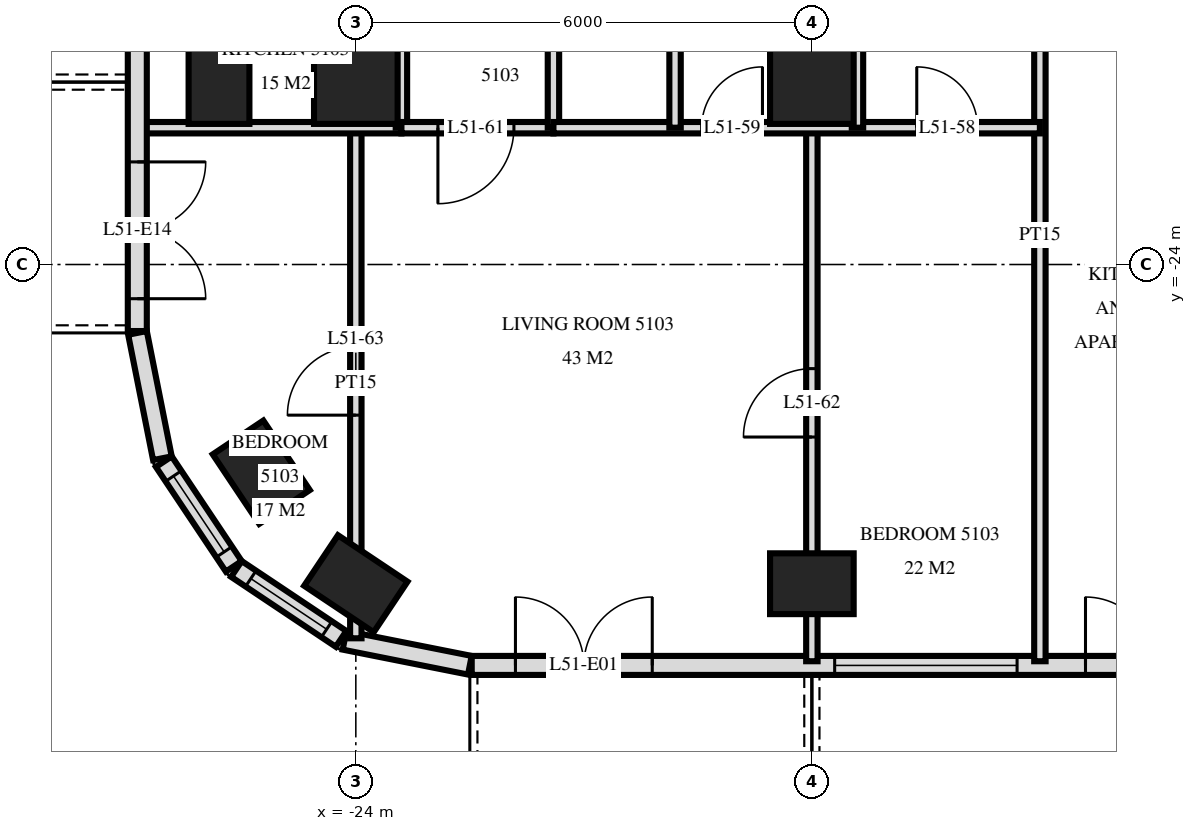
"""IFC4 building model, lengths in metres.
Left out: names, types, materials, properties, quantities, classifications, styles, units other than length and angle.
Written with IfcOpenShell. Run it as: python <this file> out.ifc"""

import sys

from ifc_helpers import new_model, si_unit, direction, frame, frame_2d, origin, origin_2d, place, context, subcontext, project, spatial, rectangle, extrude, element, fill, save


model = new_model("IFC4")
c1 = context("Model", 3, precision=1e-05, world=origin(), true_north=direction((0.0, 1.0)))
c2 = subcontext(c1, "Body", "Model", "MODEL_VIEW")
j1 = project(units=[si_unit("LENGTHUNIT", "METRE"), si_unit("PLANEANGLEUNIT", "RADIAN")], contexts=[c1])
p1 = place(None, origin())
s1 = spatial("IfcSite", under=j1, at=p1, CompositionType="ELEMENT")
p2 = place(p1, origin())
s2 = spatial("IfcBuilding", under=s1, at=p2, CompositionType="ELEMENT")
p3 = place(p2, frame((0.0, 0.0, 197.6)))
s3 = spatial("IfcBuildingStorey", under=s2, at=p3, CompositionType="ELEMENT", Elevation=197.6)
for number, where, z_axis, x_axis in (
    (1, (-25.8, -21.6, 0.0), (0.0, 0.0, 1.0), (0.0, 1.0, 0.0)),
    (2, (-25.244, -26.733, 0.0), (0.0, 0.0, 1.0), (-0.556, 0.831, 0.0)),
    (3, (-24.0, -28.2, 0.0), (0.0, 0.0, 1.0), (-0.831, 0.556, 0.0)),
):
    element("IfcColumn", number, at=place(p3, frame(where, z_axis=z_axis, x_axis=x_axis)), inside=s3, PredefinedType="COLUMN", context=c2, shape_type="SweptSolid", body=[
        extrude(rectangle(XDim=1.1, YDim=0.8, at=origin_2d()), origin(), (0.0, 0.0, 1.0), 3.5),
    ])
p4 = place(p3, frame((-24.0, -21.6, 0.0), z_axis=(0.0, 0.0, 1.0), x_axis=(1.0, 0.0, 0.0)))
e4 = element("IfcColumn", 4, at=p4, inside=s3, PredefinedType="COLUMN", context=c2, shape_type="SweptSolid", body=[
    extrude(rectangle(XDim=1.1, YDim=1.1, at=origin_2d()), origin(), (0.0, 0.0, 1.0), 3.5),
])
p5 = place(p3, frame((-18.0, -28.2, 0.0), z_axis=(0.0, 0.0, 1.0), x_axis=(1.0, 0.0, 0.0)))
e5 = element("IfcColumn", 5, at=p5, inside=s3, PredefinedType="COLUMN", context=c2, shape_type="SweptSolid", body=[
    extrude(rectangle(XDim=1.1, YDim=0.8, at=origin_2d()), origin(), (0.0, 0.0, 1.0), 3.5),
])
p6 = place(p3, frame((-18.0, -21.6, 0.0), z_axis=(0.0, 0.0, 1.0), x_axis=(1.0, 0.0, 0.0)))
e6 = element("IfcColumn", 6, at=p6, inside=s3, PredefinedType="COLUMN", context=c2, shape_type="SweptSolid", body=[
    extrude(rectangle(XDim=1.1, YDim=1.1, at=origin_2d()), origin(), (0.0, 0.0, 1.0), 3.5),
])
p7 = place(p3, frame((-26.875, -3.325, 0.0), z_axis=(0.0, 0.0, 1.0), x_axis=(0.0, -1.0, 0.0)))
e7 = element("IfcWall", 7, at=p7, inside=s3, PredefinedType="SOLIDWALL", context=c2, shape_type="SweptSolid", body=[
    extrude(rectangle(XDim=21.551, YDim=0.25, at=frame_2d((10.775, 0.0))), origin(), (0.0, 0.0, 1.0), 3.22),
])
p8 = place(p7, frame((7.775, 0.0, 0.0)))
e8 = element("IfcOpeningElement", 8, at=p8, cuts=e7, PredefinedType="OPENING", context=c2, shape_type="SweptSolid", body=[
    extrude(rectangle(XDim=1.8, YDim=2.4, at=frame_2d((0.9, 1.2))), frame((0.0, 0.135, 0.0), z_axis=(0.0, -1.0, 0.0), x_axis=(1.0, 0.0, 0.0)), (0.0, 0.0, 1.0), 0.27),
])
p9 = place(p7, frame((12.575, 0.0, 0.9)))
e9 = element("IfcOpeningElement", 9, at=p9, cuts=e7, PredefinedType="OPENING", context=c2, shape_type="SweptSolid", body=[
    extrude(rectangle(XDim=1.2, YDim=1.5, at=frame_2d((0.6, 0.75))), frame((0.0, 0.135, 0.0), z_axis=(0.0, -1.0, 0.0), x_axis=(1.0, 0.0, 0.0)), (0.0, 0.0, 1.0), 0.27),
])
p10 = place(p7, frame((15.275, 0.0, 0.0)))
e10 = element("IfcOpeningElement", 10, at=p10, cuts=e7, PredefinedType="OPENING", context=c2, shape_type="SweptSolid", body=[
    extrude(rectangle(XDim=1.8, YDim=2.4, at=frame_2d((0.9, 1.2))), frame((0.0, 0.135, 0.0), z_axis=(0.0, -1.0, 0.0), x_axis=(1.0, 0.0, 0.0)), (0.0, 0.0, 1.0), 0.27),
])
p11 = place(p7, frame((19.325, 0.0, 0.0)))
e11 = element("IfcOpeningElement", 11, at=p11, cuts=e7, PredefinedType="OPENING", context=c2, shape_type="SweptSolid", body=[
    extrude(rectangle(XDim=1.8, YDim=2.4, at=frame_2d((0.9, 1.2))), frame((0.0, 0.135, 0.0), z_axis=(0.0, -1.0, 0.0), x_axis=(1.0, 0.0, 0.0)), (0.0, 0.0, 1.0), 0.27),
])
p12 = place(p3, frame((-26.873, -24.9, 0.0), z_axis=(0.0, 0.0, 1.0), x_axis=(0.195026884138, -0.980797896849, 0.0)))
e12 = element("IfcWall", 12, at=p12, inside=s3, PredefinedType="SOLIDWALL", context=c2, shape_type="SweptSolid", body=[
    extrude(rectangle(XDim=1.681, YDim=0.25, at=frame_2d((0.841, 0.0))), origin(), (0.0, 0.0, 1.0), 3.22),
])
p13 = place(p3, frame((-26.526, -26.594, 0.0), z_axis=(0.0, 0.0, 1.0), x_axis=(0.55555029066, -0.831482937015, 0.0)))
e13 = element("IfcWall", 13, at=p13, inside=s3, PredefinedType="SOLIDWALL", context=c2, shape_type="SweptSolid", body=[
    extrude(rectangle(XDim=1.656, YDim=0.25, at=frame_2d((0.828, 0.0))), origin(), (0.0, 0.0, 1.0), 3.22),
])
p14 = place(p13, frame((0.228, 0.0, 0.9)))
e14 = element("IfcOpeningElement", 14, at=p14, cuts=e13, PredefinedType="OPENING", context=c2, shape_type="SweptSolid", body=[
    extrude(rectangle(XDim=1.2, YDim=1.5, at=frame_2d((0.6, 0.75))), frame((0.0, 0.135, 0.0), z_axis=(0.0, -1.0, 0.0), x_axis=(1.0, 0.0, 0.0)), (0.0, 0.0, 1.0), 0.27),
])
p15 = place(p3, frame((-25.571, -28.006, 0.0), z_axis=(0.0, 0.0, 1.0), x_axis=(0.831482937015, -0.55555029066, 0.0)))
e15 = element("IfcWall", 15, at=p15, inside=s3, PredefinedType="SOLIDWALL", context=c2, shape_type="SweptSolid", body=[
    extrude(rectangle(XDim=1.656, YDim=0.25, at=frame_2d((0.828, 0.0))), origin(), (0.0, 0.0, 1.0), 3.22),
])
p16 = place(p15, frame((0.228, 0.0, 0.9)))
e16 = element("IfcOpeningElement", 16, at=p16, cuts=e15, PredefinedType="OPENING", context=c2, shape_type="SweptSolid", body=[
    extrude(rectangle(XDim=1.2, YDim=1.5, at=frame_2d((0.6, 0.75))), frame((0.0, 0.135, 0.0), z_axis=(0.0, -1.0, 0.0), x_axis=(1.0, 0.0, 0.0)), (0.0, 0.0, 1.0), 0.27),
])
p17 = place(p3, frame((-24.149, -28.945, 0.0), z_axis=(0.0, 0.0, 1.0), x_axis=(0.980775640221, -0.19513878023, 0.0)))
e17 = element("IfcWall", 17, at=p17, inside=s3, PredefinedType="SOLIDWALL", context=c2, shape_type="SweptSolid", body=[
    extrude(rectangle(XDim=1.681, YDim=0.25, at=frame_2d((0.841, 0.0))), origin(), (0.0, 0.0, 1.0), 3.22),
])
p18 = place(p3, frame((-22.475, -29.275, 0.0), z_axis=(0.0, 0.0, 1.0), x_axis=(1.0, 0.0, 0.0)))
e18 = element("IfcWall", 18, at=p18, inside=s3, PredefinedType="SOLIDWALL", context=c2, shape_type="SweptSolid", body=[
    extrude(rectangle(XDim=44.951, YDim=0.25, at=frame_2d((22.475, 0.0))), origin(), (0.0, 0.0, 1.0), 3.22),
])
p19 = place(p18, frame((0.575, 0.0, 0.0)))
e19 = element("IfcOpeningElement", 19, at=p19, cuts=e18, PredefinedType="OPENING", context=c2, shape_type="SweptSolid", body=[
    extrude(rectangle(XDim=1.8, YDim=2.4, at=frame_2d((0.9, 1.2))), frame((0.0, 0.135, 0.0), z_axis=(0.0, -1.0, 0.0), x_axis=(1.0, 0.0, 0.0)), (0.0, 0.0, 1.0), 0.27),
])
p20 = place(p18, frame((4.775, 0.0, 0.9)))
e20 = element("IfcOpeningElement", 20, at=p20, cuts=e18, PredefinedType="OPENING", context=c2, shape_type="SweptSolid", body=[
    extrude(rectangle(XDim=2.4, YDim=1.5, at=frame_2d((1.2, 0.75))), frame((0.0, 0.135, 0.0), z_axis=(0.0, -1.0, 0.0), x_axis=(1.0, 0.0, 0.0)), (0.0, 0.0, 1.0), 0.27),
])
p21 = place(p18, frame((8.075, 0.0, 0.0)))
e21 = element("IfcOpeningElement", 21, at=p21, cuts=e18, PredefinedType="OPENING", context=c2, shape_type="SweptSolid", body=[
    extrude(rectangle(XDim=1.8, YDim=2.4, at=frame_2d((0.9, 1.2))), frame((0.0, 0.135, 0.0), z_axis=(0.0, -1.0, 0.0), x_axis=(1.0, 0.0, 0.0)), (0.0, 0.0, 1.0), 0.27),
])
p22 = place(p18, frame((11.075, 0.0, 0.0)))
e22 = element("IfcOpeningElement", 22, at=p22, cuts=e18, PredefinedType="OPENING", context=c2, shape_type="SweptSolid", body=[
    extrude(rectangle(XDim=1.8, YDim=2.4, at=frame_2d((0.9, 1.2))), frame((0.0, 0.135, 0.0), z_axis=(0.0, -1.0, 0.0), x_axis=(1.0, 0.0, 0.0)), (0.0, 0.0, 1.0), 0.27),
])
p23 = place(p18, frame((13.775, 0.0, 0.9)))
e23 = element("IfcOpeningElement", 23, at=p23, cuts=e18, PredefinedType="OPENING", context=c2, shape_type="SweptSolid", body=[
    extrude(rectangle(XDim=2.4, YDim=1.5, at=frame_2d((1.2, 0.75))), frame((0.0, 0.135, 0.0), z_axis=(0.0, -1.0, 0.0), x_axis=(1.0, 0.0, 0.0)), (0.0, 0.0, 1.0), 0.27),
])
p24 = place(p18, frame((16.775, 0.0, 0.9)))
e24 = element("IfcOpeningElement", 24, at=p24, cuts=e18, PredefinedType="OPENING", context=c2, shape_type="SweptSolid", body=[
    extrude(rectangle(XDim=2.4, YDim=1.5, at=frame_2d((1.2, 0.75))), frame((0.0, 0.135, 0.0), z_axis=(0.0, -1.0, 0.0), x_axis=(1.0, 0.0, 0.0)), (0.0, 0.0, 1.0), 0.27),
])
p25 = place(p18, frame((20.075, 0.0, 0.0)))
e25 = element("IfcOpeningElement", 25, at=p25, cuts=e18, PredefinedType="OPENING", context=c2, shape_type="SweptSolid", body=[
    extrude(rectangle(XDim=1.8, YDim=2.4, at=frame_2d((0.9, 1.2))), frame((0.0, 0.135, 0.0), z_axis=(0.0, -1.0, 0.0), x_axis=(1.0, 0.0, 0.0)), (0.0, 0.0, 1.0), 0.27),
])
p26 = place(p18, frame((23.075, 0.0, 0.0)))
e26 = element("IfcOpeningElement", 26, at=p26, cuts=e18, PredefinedType="OPENING", context=c2, shape_type="SweptSolid", body=[
    extrude(rectangle(XDim=1.8, YDim=2.4, at=frame_2d((0.9, 1.2))), frame((0.0, 0.135, 0.0), z_axis=(0.0, -1.0, 0.0), x_axis=(1.0, 0.0, 0.0)), (0.0, 0.0, 1.0), 0.27),
])
p27 = place(p18, frame((25.775, 0.0, 0.9)))
e27 = element("IfcOpeningElement", 27, at=p27, cuts=e18, PredefinedType="OPENING", context=c2, shape_type="SweptSolid", body=[
    extrude(rectangle(XDim=2.4, YDim=1.5, at=frame_2d((1.2, 0.75))), frame((0.0, 0.135, 0.0), z_axis=(0.0, -1.0, 0.0), x_axis=(1.0, 0.0, 0.0)), (0.0, 0.0, 1.0), 0.27),
])
p28 = place(p18, frame((29.075, 0.0, 0.0)))
e28 = element("IfcOpeningElement", 28, at=p28, cuts=e18, PredefinedType="OPENING", context=c2, shape_type="SweptSolid", body=[
    extrude(rectangle(XDim=1.8, YDim=2.4, at=frame_2d((0.9, 1.2))), frame((0.0, 0.135, 0.0), z_axis=(0.0, -1.0, 0.0), x_axis=(1.0, 0.0, 0.0)), (0.0, 0.0, 1.0), 0.27),
])
p29 = place(p18, frame((31.775, 0.0, 0.9)))
e29 = element("IfcOpeningElement", 29, at=p29, cuts=e18, PredefinedType="OPENING", context=c2, shape_type="SweptSolid", body=[
    extrude(rectangle(XDim=2.4, YDim=1.5, at=frame_2d((1.2, 0.75))), frame((0.0, 0.135, 0.0), z_axis=(0.0, -1.0, 0.0), x_axis=(1.0, 0.0, 0.0)), (0.0, 0.0, 1.0), 0.27),
])
p30 = place(p18, frame((35.075, 0.0, 0.0)))
e30 = element("IfcOpeningElement", 30, at=p30, cuts=e18, PredefinedType="OPENING", context=c2, shape_type="SweptSolid", body=[
    extrude(rectangle(XDim=1.8, YDim=2.4, at=frame_2d((0.9, 1.2))), frame((0.0, 0.135, 0.0), z_axis=(0.0, -1.0, 0.0), x_axis=(1.0, 0.0, 0.0)), (0.0, 0.0, 1.0), 0.27),
])
p31 = place(p18, frame((37.775, 0.0, 0.9)))
e31 = element("IfcOpeningElement", 31, at=p31, cuts=e18, PredefinedType="OPENING", context=c2, shape_type="SweptSolid", body=[
    extrude(rectangle(XDim=2.4, YDim=1.5, at=frame_2d((1.2, 0.75))), frame((0.0, 0.135, 0.0), z_axis=(0.0, -1.0, 0.0), x_axis=(1.0, 0.0, 0.0)), (0.0, 0.0, 1.0), 0.27),
])
p32 = place(p18, frame((41.075, 0.0, 0.0)))
e32 = element("IfcOpeningElement", 32, at=p32, cuts=e18, PredefinedType="OPENING", context=c2, shape_type="SweptSolid", body=[
    extrude(rectangle(XDim=1.8, YDim=2.4, at=frame_2d((0.9, 1.2))), frame((0.0, 0.135, 0.0), z_axis=(0.0, -1.0, 0.0), x_axis=(1.0, 0.0, 0.0)), (0.0, 0.0, 1.0), 0.27),
])
p33 = place(p3, frame((-15.0, -29.22, 0.0), z_axis=(0.0, 0.0, 1.0), x_axis=(0.0, 1.0, 0.0)))
e33 = element("IfcWall", 33, at=p33, inside=s3, PredefinedType="PARTITIONING", context=c2, shape_type="SweptSolid", body=[
    extrude(rectangle(XDim=11.22, YDim=0.15, at=frame_2d((5.61, 0.0))), origin(), (0.0, 0.0, 1.0), 3.22),
])
p34 = place(p3, frame((-17.4, -22.2, 0.0), z_axis=(0.0, 0.0, 1.0), x_axis=(0.0, 1.0, 0.0)))
e34 = element("IfcWall", 34, at=p34, inside=s3, PredefinedType="PARTITIONING", context=c2, shape_type="SweptSolid", body=[
    extrude(rectangle(XDim=4.2, YDim=0.15, at=frame_2d((2.1, 0.0))), origin(), (0.0, 0.0, 1.0), 3.22),
])
p35 = place(p3, frame((-18.0, -29.22, 0.0), z_axis=(0.0, 0.0, 1.0), x_axis=(0.0, 1.0, 0.0)))
e35 = element("IfcWall", 35, at=p35, inside=s3, PredefinedType="PARTITIONING", context=c2, shape_type="SweptSolid", body=[
    extrude(rectangle(XDim=7.02, YDim=0.15, at=frame_2d((3.51, 0.0))), origin(), (0.0, 0.0, 1.0), 3.22),
])
p36 = place(p35, frame((2.95, 0.0, 0.0)))
e36 = element("IfcOpeningElement", 36, at=p36, cuts=e35, PredefinedType="OPENING", context=c2, shape_type="SweptSolid", body=[
    extrude(rectangle(XDim=0.9, YDim=2.1, at=frame_2d((0.45, 1.05))), frame((0.0, 0.085, 0.0), z_axis=(0.0, -1.0, 0.0), x_axis=(1.0, 0.0, 0.0)), (0.0, 0.0, 1.0), 0.17),
])
for number, where, z_axis, x_axis in (
    (37, (-19.8, -22.2, 0.0), (0.0, 0.0, 1.0), (0.0, 1.0, 0.0)),
    (38, (-21.4, -22.2, 0.0), (0.0, 0.0, 1.0), (0.0, 1.0, 0.0)),
):
    element("IfcWall", number, at=place(p3, frame(where, z_axis=z_axis, x_axis=x_axis)), inside=s3, PredefinedType="PARTITIONING", context=c2, shape_type="SweptSolid", body=[
        extrude(rectangle(XDim=4.2, YDim=0.15, at=frame_2d((2.1, 0.0))), origin(), (0.0, 0.0, 1.0), 3.22),
    ])
p37 = place(p3, frame((-23.4, -22.2, 0.0), z_axis=(0.0, 0.0, 1.0), x_axis=(0.0, 1.0, 0.0)))
e39 = element("IfcWall", 39, at=p37, inside=s3, PredefinedType="PARTITIONING", context=c2, shape_type="SweptSolid", body=[
    extrude(rectangle(XDim=4.2, YDim=0.15, at=frame_2d((2.1, 0.0))), origin(), (0.0, 0.0, 1.0), 3.22),
])
p38 = place(p37, frame((1.58, 0.0, 0.0)))
e40 = element("IfcOpeningElement", 40, at=p38, cuts=e39, PredefinedType="OPENING", context=c2, shape_type="SweptSolid", body=[
    extrude(rectangle(XDim=1.0, YDim=2.1, at=frame_2d((0.5, 1.05))), frame((0.0, 0.085, 0.0), z_axis=(0.0, -1.0, 0.0), x_axis=(1.0, 0.0, 0.0)), (0.0, 0.0, 1.0), 0.17),
])
p39 = place(p3, frame((-24.0, -28.918, 0.0), z_axis=(0.0, 0.0, 1.0), x_axis=(0.0, 1.0, 0.0)))
e41 = element("IfcWall", 41, at=p39, inside=s3, PredefinedType="PARTITIONING", context=c2, shape_type="SweptSolid", body=[
    extrude(rectangle(XDim=6.718, YDim=0.15, at=frame_2d((3.359, 0.0))), origin(), (0.0, 0.0, 1.0), 3.22),
])
p40 = place(p39, frame((2.936, 0.0, 0.0)))
e42 = element("IfcOpeningElement", 42, at=p40, cuts=e41, PredefinedType="OPENING", context=c2, shape_type="SweptSolid", body=[
    extrude(rectangle(XDim=0.9, YDim=2.1, at=frame_2d((0.45, 1.05))), frame((0.0, 0.085, 0.0), z_axis=(0.0, -1.0, 0.0), x_axis=(1.0, 0.0, 0.0)), (0.0, 0.0, 1.0), 0.17),
])
p41 = place(p3, frame((-23.4, -22.2, 0.0), z_axis=(0.0, 0.0, 1.0), x_axis=(1.0, 0.0, 0.0)))
e43 = element("IfcWall", 43, at=p41, inside=s3, PredefinedType="PARTITIONING", context=c2, shape_type="SweptSolid", body=[
    extrude(rectangle(XDim=2.0, YDim=0.15, at=frame_2d((1.0, 0.0))), origin(), (0.0, 0.0, 1.0), 3.22),
])
p42 = place(p41, frame((0.48, 0.0, 0.0)))
e44 = element("IfcOpeningElement", 44, at=p42, cuts=e43, PredefinedType="OPENING", context=c2, shape_type="SweptSolid", body=[
    extrude(rectangle(XDim=1.0, YDim=2.1, at=frame_2d((0.5, 1.05))), frame((0.0, 0.085, 0.0), z_axis=(0.0, -1.0, 0.0), x_axis=(1.0, 0.0, 0.0)), (0.0, 0.0, 1.0), 0.17),
])
p43 = place(p3, frame((-26.82, -22.2, 0.0), z_axis=(0.0, 0.0, 1.0), x_axis=(1.0, 0.0, 0.0)))
e45 = element("IfcWall", 45, at=p43, inside=s3, PredefinedType="PARTITIONING", context=c2, shape_type="SweptSolid", body=[
    extrude(rectangle(XDim=3.42, YDim=0.15, at=frame_2d((1.71, 0.0))), origin(), (0.0, 0.0, 1.0), 3.22),
])
p44 = place(p3, frame((-21.4, -22.2, 0.0), z_axis=(0.0, 0.0, 1.0), x_axis=(1.0, 0.0, 0.0)))
e46 = element("IfcWall", 46, at=p44, inside=s3, PredefinedType="PARTITIONING", context=c2, shape_type="SweptSolid", body=[
    extrude(rectangle(XDim=6.4, YDim=0.15, at=frame_2d((3.2, 0.0))), origin(), (0.0, 0.0, 1.0), 3.22),
])
p45 = place(p44, frame((4.78, 0.0, 0.0)))
e47 = element("IfcOpeningElement", 47, at=p45, cuts=e46, PredefinedType="OPENING", context=c2, shape_type="SweptSolid", body=[
    extrude(rectangle(XDim=0.8, YDim=2.1, at=frame_2d((0.4, 1.05))), frame((0.0, 0.085, 0.0), z_axis=(0.0, -1.0, 0.0), x_axis=(1.0, 0.0, 0.0)), (0.0, 0.0, 1.0), 0.17),
])
p46 = place(p44, frame((1.95, 0.0, 0.0)))
e48 = element("IfcOpeningElement", 48, at=p46, cuts=e46, PredefinedType="OPENING", context=c2, shape_type="SweptSolid", body=[
    extrude(rectangle(XDim=0.8, YDim=2.1, at=frame_2d((0.4, 1.05))), frame((0.0, 0.085, 0.0), z_axis=(0.0, -1.0, 0.0), x_axis=(1.0, 0.0, 0.0)), (0.0, 0.0, 1.0), 0.17),
])
p47 = place(p14, origin())
e49 = element("IfcWindow", 49, at=p47, inside=s3, PartitioningType="SINGLE_PANEL", PredefinedType="WINDOW", context=c2, shape_type="SweptSolid", body=[
    extrude(rectangle(XDim=1.2, YDim=1.5, at=frame_2d((0.6, 0.75))), frame((0.0, 0.03, 0.0), z_axis=(0.0, -1.0, 0.0), x_axis=(1.0, 0.0, 0.0)), (0.0, 0.0, 1.0), 0.06),
])
fill(e14, e49)
p48 = place(p16, origin())
e50 = element("IfcWindow", 50, at=p48, inside=s3, PartitioningType="SINGLE_PANEL", PredefinedType="WINDOW", context=c2, shape_type="SweptSolid", body=[
    extrude(rectangle(XDim=1.2, YDim=1.5, at=frame_2d((0.6, 0.75))), frame((0.0, 0.03, 0.0), z_axis=(0.0, -1.0, 0.0), x_axis=(1.0, 0.0, 0.0)), (0.0, 0.0, 1.0), 0.06),
])
fill(e16, e50)
p49 = place(p19, origin())
e51 = element("IfcDoor", 51, at=p49, inside=s3, OperationType="DOUBLE_DOOR_SINGLE_SWING", PredefinedType="DOOR", context=c2, shape_type="SweptSolid", body=[
    extrude(rectangle(XDim=1.8, YDim=2.4, at=frame_2d((0.9, 1.2))), frame((0.0, 0.025, 0.0), z_axis=(0.0, -1.0, 0.0), x_axis=(1.0, 0.0, 0.0)), (0.0, 0.0, 1.0), 0.05),
])
fill(e19, e51)
p50 = place(p20, origin())
e52 = element("IfcWindow", 52, at=p50, inside=s3, PartitioningType="SINGLE_PANEL", PredefinedType="WINDOW", context=c2, shape_type="SweptSolid", body=[
    extrude(rectangle(XDim=2.4, YDim=1.5, at=frame_2d((1.2, 0.75))), frame((0.0, 0.03, 0.0), z_axis=(0.0, -1.0, 0.0), x_axis=(1.0, 0.0, 0.0)), (0.0, 0.0, 1.0), 0.06),
])
fill(e20, e52)
p51 = place(p21, origin())
e53 = element("IfcDoor", 53, at=p51, inside=s3, OperationType="DOUBLE_DOOR_SINGLE_SWING", PredefinedType="DOOR", context=c2, shape_type="SweptSolid", body=[
    extrude(rectangle(XDim=1.8, YDim=2.4, at=frame_2d((0.9, 1.2))), frame((0.0, 0.025, 0.0), z_axis=(0.0, -1.0, 0.0), x_axis=(1.0, 0.0, 0.0)), (0.0, 0.0, 1.0), 0.05),
])
fill(e21, e53)
p52 = place(p11, origin())
e54 = element("IfcDoor", 54, at=p52, inside=s3, OperationType="DOUBLE_DOOR_SINGLE_SWING", PredefinedType="DOOR", context=c2, shape_type="SweptSolid", body=[
    extrude(rectangle(XDim=1.8, YDim=2.4, at=frame_2d((0.9, 1.2))), frame((0.0, 0.025, 0.0), z_axis=(0.0, -1.0, 0.0), x_axis=(1.0, 0.0, 0.0)), (0.0, 0.0, 1.0), 0.05),
])
fill(e11, e54)
p53 = place(p45, origin())
e55 = element("IfcDoor", 55, at=p53, inside=s3, OperationType="SINGLE_SWING_RIGHT", PredefinedType="DOOR", context=c2, shape_type="SweptSolid", body=[
    extrude(rectangle(XDim=0.8, YDim=2.1, at=frame_2d((0.4, 1.05))), frame((0.0, 0.025, 0.0), z_axis=(0.0, -1.0, 0.0), x_axis=(1.0, 0.0, 0.0)), (0.0, 0.0, 1.0), 0.05),
])
fill(e47, e55)
p54 = place(p46, origin())
e56 = element("IfcDoor", 56, at=p54, inside=s3, OperationType="SINGLE_SWING_LEFT", PredefinedType="DOOR", context=c2, shape_type="SweptSolid", body=[
    extrude(rectangle(XDim=0.8, YDim=2.1, at=frame_2d((0.4, 1.05))), frame((0.0, 0.025, 0.0), z_axis=(0.0, -1.0, 0.0), x_axis=(1.0, 0.0, 0.0)), (0.0, 0.0, 1.0), 0.05),
])
fill(e48, e56)
p55 = place(p42, frame((0.5, 0.0, 0.0), z_axis=(0.0, 0.0, 1.0), x_axis=(-1.0, 0.0, 0.0)))
e57 = element("IfcDoor", 57, at=p55, inside=s3, OperationType="SINGLE_SWING_LEFT", PredefinedType="DOOR", context=c2, shape_type="SweptSolid", body=[
    extrude(rectangle(XDim=1.0, YDim=2.1, at=frame_2d((0.0, 1.05))), frame((0.0, -0.025, 0.0), z_axis=(0.0, 1.0, 0.0), x_axis=(-1.0, 0.0, 0.0)), (0.0, 0.0, 1.0), 0.05),
])
fill(e44, e57)
p56 = place(p36, origin())
e58 = element("IfcDoor", 58, at=p56, inside=s3, OperationType="SINGLE_SWING_RIGHT", PredefinedType="DOOR", context=c2, shape_type="SweptSolid", body=[
    extrude(rectangle(XDim=0.9, YDim=2.1, at=frame_2d((0.45, 1.05))), frame((0.0, 0.025, 0.0), z_axis=(0.0, -1.0, 0.0), x_axis=(1.0, 0.0, 0.0)), (0.0, 0.0, 1.0), 0.05),
])
fill(e36, e58)
p57 = place(p40, origin())
e59 = element("IfcDoor", 59, at=p57, inside=s3, OperationType="SINGLE_SWING_RIGHT", PredefinedType="DOOR", context=c2, shape_type="SweptSolid", body=[
    extrude(rectangle(XDim=0.9, YDim=2.1, at=frame_2d((0.45, 1.05))), frame((0.0, 0.025, 0.0), z_axis=(0.0, -1.0, 0.0), x_axis=(1.0, 0.0, 0.0)), (0.0, 0.0, 1.0), 0.05),
])
fill(e42, e59)
save(model, sys.argv[1])
